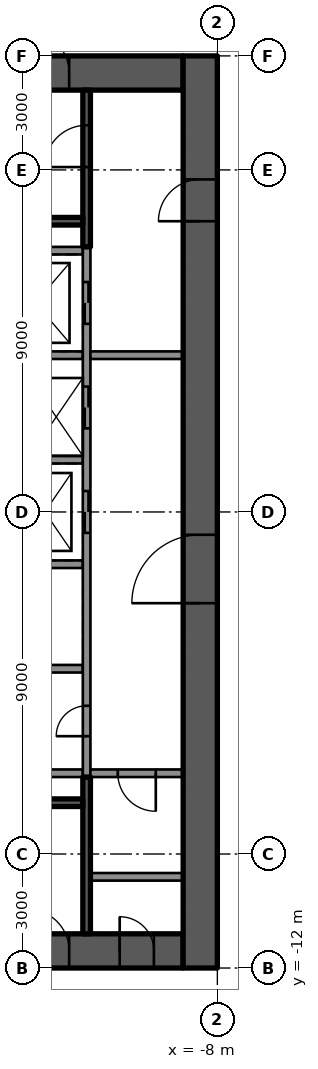
"""IFC4 building model, lengths in metres.
Left out: names, types, materials, properties, quantities, classifications, styles, units other than length and angle.
Written with IfcOpenShell. Run it as: python <this file> out.ifc"""

import sys

from ifc_helpers import new_model, si_unit, direction, frame, frame_2d, origin, place, context, subcontext, project, spatial, rectangle, extrude, element, fill, save


model = new_model("IFC4")
c1 = context("Model", 3, precision=1e-05, world=origin(), true_north=direction((0.0, 1.0)))
c2 = subcontext(c1, "Body", "Model", "MODEL_VIEW")
j1 = project(units=[si_unit("LENGTHUNIT", "METRE"), si_unit("PLANEANGLEUNIT", "RADIAN")], contexts=[c1])
p1 = place(None, origin())
s1 = spatial("IfcSite", under=j1, at=p1, CompositionType="ELEMENT")
p2 = place(p1, origin())
s2 = spatial("IfcBuilding", under=s1, at=p2, CompositionType="ELEMENT")
p3 = place(p2, frame((0.0, 0.0, 51.3)))
s3 = spatial("IfcBuildingStorey", under=s2, at=p3, CompositionType="ELEMENT", Elevation=51.3)
p4 = place(p3, frame((-18.1, 11.55, 0.0), z_axis=(0.0, 0.0, 1.0), x_axis=(1.0, 0.0, 0.0)))
e1 = element("IfcWall", 1, at=p4, inside=s3, PredefinedType="SHEAR", context=c2, shape_type="SweptSolid", body=[
    extrude(rectangle(XDim=9.2, YDim=0.9, at=frame_2d((4.6, 0.0))), origin(), (0.0, 0.0, 1.0), 3.5),
])
p5 = place(p4, frame((5.1, 0.0, 0.0)))
e2 = element("IfcOpeningElement", 2, at=p5, cuts=e1, PredefinedType="OPENING", context=c2, shape_type="SweptSolid", body=[
    extrude(rectangle(XDim=1.1, YDim=2.1, at=frame_2d((0.55, 1.05))), frame((0.0, 0.46, 0.0), z_axis=(0.0, -1.0, 0.0), x_axis=(1.0, 0.0, 0.0)), (0.0, 0.0, 1.0), 0.92),
])
p6 = place(p3, frame((-18.1, -11.55, 0.0), z_axis=(0.0, 0.0, 1.0), x_axis=(1.0, 0.0, 0.0)))
e3 = element("IfcWall", 3, at=p6, inside=s3, PredefinedType="SHEAR", context=c2, shape_type="SweptSolid", body=[
    extrude(rectangle(XDim=9.2, YDim=0.9, at=frame_2d((4.6, 0.0))), origin(), (0.0, 0.0, 1.0), 3.5),
])
p7 = place(p6, frame((5.1, 0.0, 0.0)))
e4 = element("IfcOpeningElement", 4, at=p7, cuts=e3, PredefinedType="OPENING", context=c2, shape_type="SweptSolid", body=[
    extrude(rectangle(XDim=1.1, YDim=2.1, at=frame_2d((0.55, 1.05))), frame((0.0, 0.46, 0.0), z_axis=(0.0, -1.0, 0.0), x_axis=(1.0, 0.0, 0.0)), (0.0, 0.0, 1.0), 0.92),
])
p8 = place(p6, frame((7.53, 0.0, 0.0)))
e5 = element("IfcOpeningElement", 5, at=p8, cuts=e3, PredefinedType="OPENING", context=c2, shape_type="SweptSolid", body=[
    extrude(rectangle(XDim=0.9, YDim=2.1, at=frame_2d((0.45, 1.05))), frame((0.0, 0.46, 0.0), z_axis=(0.0, -1.0, 0.0), x_axis=(1.0, 0.0, 0.0)), (0.0, 0.0, 1.0), 0.92),
])
p9 = place(p3, frame((-8.45, -12.0, 0.0), z_axis=(0.0, 0.0, 1.0), x_axis=(0.0, 1.0, 0.0)))
e6 = element("IfcWall", 6, at=p9, inside=s3, PredefinedType="SHEAR", context=c2, shape_type="SweptSolid", body=[
    extrude(rectangle(XDim=24.0, YDim=0.9, at=frame_2d((12.0, 0.0))), origin(), (0.0, 0.0, 1.0), 3.5),
])
p10 = place(p9, frame((9.6, 0.0, 0.0)))
e7 = element("IfcOpeningElement", 7, at=p10, cuts=e6, PredefinedType="OPENING", context=c2, shape_type="SweptSolid", body=[
    extrude(rectangle(XDim=1.8, YDim=2.1, at=frame_2d((0.9, 1.05))), frame((0.0, 0.46, 0.0), z_axis=(0.0, -1.0, 0.0), x_axis=(1.0, 0.0, 0.0)), (0.0, 0.0, 1.0), 0.92),
])
p11 = place(p9, frame((19.65, 0.0, 0.0)))
e8 = element("IfcOpeningElement", 8, at=p11, cuts=e6, PredefinedType="OPENING", context=c2, shape_type="SweptSolid", body=[
    extrude(rectangle(XDim=1.1, YDim=2.1, at=frame_2d((0.55, 1.05))), frame((0.0, 0.46, 0.0), z_axis=(0.0, -1.0, 0.0), x_axis=(1.0, 0.0, 0.0)), (0.0, 0.0, 1.0), 0.92),
])
for number, where, z_axis, x_axis in (
    (9, (-11.54, 6.875, 0.0), (0.0, 0.0, 1.0), (-1.0, 0.0, 0.0)),
    (10, (-11.54, -6.875, 0.0), (0.0, 0.0, 1.0), (-1.0, 0.0, 0.0)),
):
    element("IfcWall", number, at=place(p3, frame(where, z_axis=z_axis, x_axis=x_axis)), inside=s3, PredefinedType="SOLIDWALL", context=c2, shape_type="SweptSolid", body=[
        extrude(rectangle(XDim=6.56, YDim=0.2, at=frame_2d((3.28, 0.0))), origin(), (0.0, 0.0, 1.0), 3.09),
    ])
p12 = place(p3, frame((-11.54, -4.125, 0.0), z_axis=(0.0, 0.0, 1.0), x_axis=(-1.0, 0.0, 0.0)))
e11 = element("IfcWall", 11, at=p12, inside=s3, PredefinedType="SOLIDWALL", context=c2, shape_type="SweptSolid", body=[
    extrude(rectangle(XDim=4.7, YDim=0.2, at=frame_2d((2.35, 0.0))), origin(), (0.0, 0.0, 1.0), 3.09),
])
for number, where, z_axis, x_axis in (
    (12, (-11.54, -1.375, 0.0), (0.0, 0.0, 1.0), (-1.0, 0.0, 0.0)),
    (13, (-11.54, 1.375, 0.0), (0.0, 0.0, 1.0), (-1.0, 0.0, 0.0)),
):
    element("IfcWall", number, at=place(p3, frame(where, z_axis=z_axis, x_axis=x_axis)), inside=s3, PredefinedType="SOLIDWALL", context=c2, shape_type="SweptSolid", body=[
        extrude(rectangle(XDim=4.2, YDim=0.2, at=frame_2d((2.1, 0.0))), origin(), (0.0, 0.0, 1.0), 3.09),
    ])
p13 = place(p3, frame((-11.54, 4.125, 0.0), z_axis=(0.0, 0.0, 1.0), x_axis=(-1.0, 0.0, 0.0)))
e14 = element("IfcWall", 14, at=p13, inside=s3, PredefinedType="SOLIDWALL", context=c2, shape_type="SweptSolid", body=[
    extrude(rectangle(XDim=4.7, YDim=0.2, at=frame_2d((2.35, 0.0))), origin(), (0.0, 0.0, 1.0), 3.09),
])
p14 = place(p3, frame((-11.44, -6.975, 0.0), z_axis=(0.0, 0.0, 1.0), x_axis=(0.0, 1.0, 0.0)))
e15 = element("IfcWall", 15, at=p14, inside=s3, PredefinedType="SOLIDWALL", context=c2, shape_type="SweptSolid", body=[
    extrude(rectangle(XDim=13.95, YDim=0.2, at=frame_2d((6.975, 0.0))), origin(), (0.0, 0.0, 1.0), 3.09),
])
p15 = place(p14, frame((6.425, 0.0, 0.0)))
e16 = element("IfcOpeningElement", 16, at=p15, cuts=e15, PredefinedType="OPENING", context=c2, shape_type="SweptSolid", body=[
    extrude(rectangle(XDim=1.1, YDim=2.1, at=frame_2d((0.55, 1.05))), frame((0.0, 0.11, 0.0), z_axis=(0.0, -1.0, 0.0), x_axis=(1.0, 0.0, 0.0)), (0.0, 0.0, 1.0), 0.22),
])
p16 = place(p14, frame((9.175, 0.0, 0.0)))
e17 = element("IfcOpeningElement", 17, at=p16, cuts=e15, PredefinedType="OPENING", context=c2, shape_type="SweptSolid", body=[
    extrude(rectangle(XDim=1.1, YDim=2.1, at=frame_2d((0.55, 1.05))), frame((0.0, 0.11, 0.0), z_axis=(0.0, -1.0, 0.0), x_axis=(1.0, 0.0, 0.0)), (0.0, 0.0, 1.0), 0.22),
])
p17 = place(p14, frame((11.925, 0.0, 0.0)))
e18 = element("IfcOpeningElement", 18, at=p17, cuts=e15, PredefinedType="OPENING", context=c2, shape_type="SweptSolid", body=[
    extrude(rectangle(XDim=1.1, YDim=2.1, at=frame_2d((0.55, 1.05))), frame((0.0, 0.11, 0.0), z_axis=(0.0, -1.0, 0.0), x_axis=(1.0, 0.0, 0.0)), (0.0, 0.0, 1.0), 0.22),
])
p18 = place(p14, frame((1.075, 0.0, 0.0)))
e19 = element("IfcOpeningElement", 19, at=p18, cuts=e15, PredefinedType="OPENING", context=c2, shape_type="SweptSolid", body=[
    extrude(rectangle(XDim=0.8, YDim=2.1, at=frame_2d((0.4, 1.05))), frame((0.0, 0.11, 0.0), z_axis=(0.0, -1.0, 0.0), x_axis=(1.0, 0.0, 0.0)), (0.0, 0.0, 1.0), 0.22),
])
p19 = place(p3, frame((-11.44, 6.975, 0.0), z_axis=(0.0, 0.0, 1.0), x_axis=(0.0, 1.0, 0.0)))
e20 = element("IfcWall", 20, at=p19, inside=s3, PredefinedType="SOLIDWALL", context=c2, shape_type="SweptSolid", body=[
    extrude(rectangle(XDim=4.125, YDim=0.2, at=frame_2d((2.062, 0.0))), origin(), (0.0, 0.0, 1.0), 3.09),
])
p20 = place(p19, frame((2.1, 0.0, 0.0)))
e21 = element("IfcOpeningElement", 21, at=p20, cuts=e20, PredefinedType="OPENING", context=c2, shape_type="SweptSolid", body=[
    extrude(rectangle(XDim=1.1, YDim=2.1, at=frame_2d((0.55, 1.05))), frame((0.0, 0.11, 0.0), z_axis=(0.0, -1.0, 0.0), x_axis=(1.0, 0.0, 0.0)), (0.0, 0.0, 1.0), 0.22),
])
p21 = place(p3, frame((-11.54, 7.65, 0.0), z_axis=(0.0, 0.0, 1.0), x_axis=(-1.0, 0.0, 0.0)))
e22 = element("IfcWall", 22, at=p21, inside=s3, PredefinedType="SOLIDWALL", context=c2, shape_type="SweptSolid", body=[
    extrude(rectangle(XDim=6.56, YDim=0.2, at=frame_2d((3.28, 0.0))), origin(), (0.0, 0.0, 1.0), 3.09),
])
p22 = place(p3, frame((-11.44, -11.1, 0.0), z_axis=(0.0, 0.0, 1.0), x_axis=(0.0, 1.0, 0.0)))
e23 = element("IfcWall", 23, at=p22, inside=s3, PredefinedType="SOLIDWALL", context=c2, shape_type="SweptSolid", body=[
    extrude(rectangle(XDim=4.125, YDim=0.2, at=frame_2d((2.062, 0.0))), origin(), (0.0, 0.0, 1.0), 3.09),
])
p23 = place(p3, frame((-11.54, -7.65, 0.0), z_axis=(0.0, 0.0, 1.0), x_axis=(-1.0, 0.0, 0.0)))
e24 = element("IfcWall", 24, at=p23, inside=s3, PredefinedType="SOLIDWALL", context=c2, shape_type="SweptSolid", body=[
    extrude(rectangle(XDim=6.56, YDim=0.2, at=frame_2d((3.28, 0.0))), origin(), (0.0, 0.0, 1.0), 3.09),
])
p24 = place(p3, frame((-8.9, 4.125, 0.0), z_axis=(0.0, 0.0, 1.0), x_axis=(-1.0, 0.0, 0.0)))
e25 = element("IfcWall", 25, at=p24, inside=s3, PredefinedType="PARTITIONING", context=c2, shape_type="SweptSolid", body=[
    extrude(rectangle(XDim=2.44, YDim=0.2, at=frame_2d((1.22, 0.0))), origin(), (0.0, 0.0, 1.0), 3.09),
])
p25 = place(p3, frame((-8.9, -6.875, 0.0), z_axis=(0.0, 0.0, 1.0), x_axis=(-1.0, 0.0, 0.0)))
e26 = element("IfcWall", 26, at=p25, inside=s3, PredefinedType="PARTITIONING", context=c2, shape_type="SweptSolid", body=[
    extrude(rectangle(XDim=2.44, YDim=0.2, at=frame_2d((1.22, 0.0))), origin(), (0.0, 0.0, 1.0), 3.09),
])
p26 = place(p25, frame((0.72, 0.0, 0.0)))
e27 = element("IfcOpeningElement", 27, at=p26, cuts=e26, PredefinedType="OPENING", context=c2, shape_type="SweptSolid", body=[
    extrude(rectangle(XDim=1.0, YDim=2.1, at=frame_2d((0.5, 1.05))), frame((0.0, 0.11, 0.0), z_axis=(0.0, -1.0, 0.0), x_axis=(1.0, 0.0, 0.0)), (0.0, 0.0, 1.0), 0.22),
])
p27 = place(p3, frame((-8.9, -9.6, 0.0), z_axis=(0.0, 0.0, 1.0), x_axis=(-1.0, 0.0, 0.0)))
e28 = element("IfcWall", 28, at=p27, inside=s3, PredefinedType="PARTITIONING", context=c2, shape_type="SweptSolid", body=[
    extrude(rectangle(XDim=2.44, YDim=0.2, at=frame_2d((1.22, 0.0))), origin(), (0.0, 0.0, 1.0), 3.09),
])
p28 = place(p15, origin())
e29 = element("IfcDoor", 29, at=p28, inside=s3, OperationType="DOUBLE_DOOR_SLIDING", PredefinedType="DOOR", context=c2, shape_type="SweptSolid", body=[
    extrude(rectangle(XDim=1.1, YDim=2.1, at=frame_2d((0.55, 1.05))), frame((0.0, 0.025, 0.0), z_axis=(0.0, -1.0, 0.0), x_axis=(1.0, 0.0, 0.0)), (0.0, 0.0, 1.0), 0.05),
])
fill(e16, e29)
p29 = place(p16, origin())
e30 = element("IfcDoor", 30, at=p29, inside=s3, OperationType="DOUBLE_DOOR_SLIDING", PredefinedType="DOOR", context=c2, shape_type="SweptSolid", body=[
    extrude(rectangle(XDim=1.1, YDim=2.1, at=frame_2d((0.55, 1.05))), frame((0.0, 0.025, 0.0), z_axis=(0.0, -1.0, 0.0), x_axis=(1.0, 0.0, 0.0)), (0.0, 0.0, 1.0), 0.05),
])
fill(e17, e30)
p30 = place(p17, origin())
e31 = element("IfcDoor", 31, at=p30, inside=s3, OperationType="DOUBLE_DOOR_SLIDING", PredefinedType="DOOR", context=c2, shape_type="SweptSolid", body=[
    extrude(rectangle(XDim=1.1, YDim=2.1, at=frame_2d((0.55, 1.05))), frame((0.0, 0.025, 0.0), z_axis=(0.0, -1.0, 0.0), x_axis=(1.0, 0.0, 0.0)), (0.0, 0.0, 1.0), 0.05),
])
fill(e18, e31)
p31 = place(p18, origin())
e32 = element("IfcDoor", 32, at=p31, inside=s3, OperationType="SINGLE_SWING_LEFT", PredefinedType="DOOR", context=c2, shape_type="SweptSolid", body=[
    extrude(rectangle(XDim=0.8, YDim=2.1, at=frame_2d((0.4, 1.05))), frame((0.0, 0.025, 0.0), z_axis=(0.0, -1.0, 0.0), x_axis=(1.0, 0.0, 0.0)), (0.0, 0.0, 1.0), 0.05),
])
fill(e19, e32)
p32 = place(p10, origin())
e33 = element("IfcDoor", 33, at=p32, inside=s3, OperationType="SINGLE_SWING_LEFT", PredefinedType="DOOR", context=c2, shape_type="SweptSolid", body=[
    extrude(rectangle(XDim=1.8, YDim=2.1, at=frame_2d((0.9, 1.05))), frame((0.0, 0.025, 0.0), z_axis=(0.0, -1.0, 0.0), x_axis=(1.0, 0.0, 0.0)), (0.0, 0.0, 1.0), 0.05),
])
fill(e7, e33)
p33 = place(p11, origin())
e34 = element("IfcDoor", 34, at=p33, inside=s3, OperationType="SINGLE_SWING_RIGHT", PredefinedType="DOOR", context=c2, shape_type="SweptSolid", body=[
    extrude(rectangle(XDim=1.1, YDim=2.1, at=frame_2d((0.55, 1.05))), frame((0.0, 0.025, 0.0), z_axis=(0.0, -1.0, 0.0), x_axis=(1.0, 0.0, 0.0)), (0.0, 0.0, 1.0), 0.05),
])
fill(e8, e34)
p34 = place(p5, origin())
e35 = element("IfcDoor", 35, at=p34, inside=s3, OperationType="SINGLE_SWING_RIGHT", PredefinedType="DOOR", context=c2, shape_type="SweptSolid", body=[
    extrude(rectangle(XDim=1.1, YDim=2.1, at=frame_2d((0.55, 1.05))), frame((0.0, 0.025, 0.0), z_axis=(0.0, -1.0, 0.0), x_axis=(1.0, 0.0, 0.0)), (0.0, 0.0, 1.0), 0.05),
])
fill(e2, e35)
p35 = place(p7, origin())
e36 = element("IfcDoor", 36, at=p35, inside=s3, OperationType="SINGLE_SWING_RIGHT", PredefinedType="DOOR", context=c2, shape_type="SweptSolid", body=[
    extrude(rectangle(XDim=1.1, YDim=2.1, at=frame_2d((0.55, 1.05))), frame((0.0, 0.025, 0.0), z_axis=(0.0, -1.0, 0.0), x_axis=(1.0, 0.0, 0.0)), (0.0, 0.0, 1.0), 0.05),
])
fill(e4, e36)
p36 = place(p20, origin())
e37 = element("IfcDoor", 37, at=p36, inside=s3, OperationType="SINGLE_SWING_RIGHT", PredefinedType="DOOR", context=c2, shape_type="SweptSolid", body=[
    extrude(rectangle(XDim=1.1, YDim=2.1, at=frame_2d((0.55, 1.05))), frame((0.0, 0.025, 0.0), z_axis=(0.0, -1.0, 0.0), x_axis=(1.0, 0.0, 0.0)), (0.0, 0.0, 1.0), 0.05),
])
fill(e21, e37)
p37 = place(p8, origin())
e38 = element("IfcDoor", 38, at=p37, inside=s3, OperationType="SINGLE_SWING_RIGHT", PredefinedType="DOOR", context=c2, shape_type="SweptSolid", body=[
    extrude(rectangle(XDim=0.9, YDim=2.1, at=frame_2d((0.45, 1.05))), frame((0.0, 0.025, 0.0), z_axis=(0.0, -1.0, 0.0), x_axis=(1.0, 0.0, 0.0)), (0.0, 0.0, 1.0), 0.05),
])
fill(e5, e38)
p38 = place(p26, origin())
e39 = element("IfcDoor", 39, at=p38, inside=s3, OperationType="SINGLE_SWING_RIGHT", PredefinedType="DOOR", context=c2, shape_type="SweptSolid", body=[
    extrude(rectangle(XDim=1.0, YDim=2.1, at=frame_2d((0.5, 1.05))), frame((0.0, 0.025, 0.0), z_axis=(0.0, -1.0, 0.0), x_axis=(1.0, 0.0, 0.0)), (0.0, 0.0, 1.0), 0.05),
])
fill(e27, e39)
save(model, sys.argv[1])
